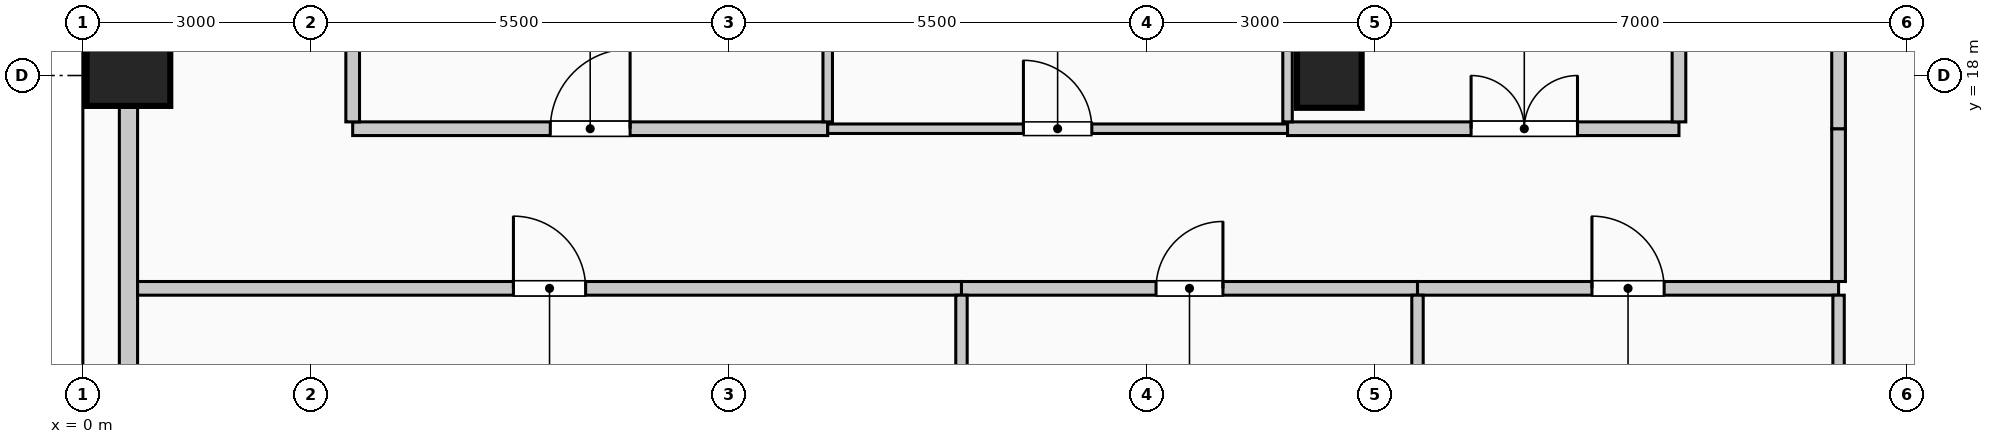
"""IFC4 building model, lengths in metres.
Left out: names, types, materials, properties, quantities, classifications, styles, units other than length and angle.
Written with IfcOpenShell. Run it as: python <this file> out.ifc"""

import sys

from ifc_helpers import new_model, si_unit, direction, frame, frame_2d, origin, origin_2d, place, context, subcontext, project, spatial, rectangle, circle, extrude, element, fill, save


model = new_model("IFC4")
c1 = context("Model", 3, precision=1e-05, world=origin(), true_north=direction((0.0, 1.0)))
c2 = subcontext(c1, "Body", "Model", "MODEL_VIEW")
j1 = project(units=[si_unit("LENGTHUNIT", "METRE"), si_unit("PLANEANGLEUNIT", "RADIAN")], contexts=[c1])
p1 = place(None, origin())
s1 = spatial("IfcSite", under=j1, at=p1, CompositionType="ELEMENT")
p2 = place(p1, origin())
s2 = spatial("IfcBuilding", under=s1, at=p2, CompositionType="ELEMENT")
p3 = place(p2, frame((0.0, 0.0, 170.6)))
s3 = spatial("IfcBuildingStorey", under=s2, at=p3, CompositionType="ELEMENT", Elevation=170.6)
p4 = place(p3, frame((0.6, 18.0, 0.0), z_axis=(0.0, 0.0, 1.0), x_axis=(0.0, 1.0, 0.0)))
e1 = element("IfcColumn", 1, at=p4, inside=s3, PredefinedType="COLUMN", context=c2, shape_type="SweptSolid", body=[
    extrude(rectangle(XDim=0.8, YDim=1.1, at=origin_2d()), origin(), (0.0, 0.0, 1.0), 4.0),
])
p5 = place(p3, frame((16.4, 18.0, 0.0), z_axis=(0.0, 0.0, 1.0), x_axis=(1.0, 0.0, 0.0)))
e2 = element("IfcColumn", 2, at=p5, inside=s3, PredefinedType="COLUMN", context=c2, shape_type="SweptSolid", body=[
    extrude(circle(Radius=0.425, at=origin_2d()), origin(), (0.0, 0.0, 1.0), 4.0),
])
p6 = place(p3, frame((0.6, 10.42, 0.0), z_axis=(0.0, 0.0, 1.0), x_axis=(0.0, 1.0, 0.0)))
e3 = element("IfcWall", 3, at=p6, inside=s3, PredefinedType="SOLIDWALL", context=c2, shape_type="SweptSolid", body=[
    extrude(rectangle(XDim=7.16, YDim=0.24, at=frame_2d((3.58, 0.0))), origin(), (0.0, 0.0, 1.0), 2.975),
])
p7 = place(p6, frame((1.387, 0.0, 0.42)))
e4 = element("IfcOpeningElement", 4, at=p7, cuts=e3, PredefinedType="OPENING", context=c2, shape_type="SweptSolid", body=[
    extrude(rectangle(XDim=1.5, YDim=2.2, at=frame_2d((0.75, 1.1))), frame((0.0, 0.13, 0.0), z_axis=(0.0, -1.0, 0.0), x_axis=(1.0, 0.0, 0.0)), (0.0, 0.0, 1.0), 0.26),
])
p8 = place(p3, frame((0.72, 15.2, 0.0), z_axis=(0.0, 0.0, 1.0), x_axis=(1.0, 0.0, 0.0)))
e5 = element("IfcWall", 5, at=p8, inside=s3, PredefinedType="PARTITIONING", context=c2, shape_type="SweptSolid", body=[
    extrude(rectangle(XDim=10.84, YDim=0.18, at=frame_2d((5.42, 0.0))), origin(), (0.0, 0.0, 1.0), 3.725),
])
p9 = place(p8, frame((4.945, 0.0, 0.0)))
e6 = element("IfcOpeningElement", 6, at=p9, cuts=e5, PredefinedType="OPENING", context=c2, shape_type="SweptSolid", body=[
    extrude(rectangle(XDim=0.95, YDim=2.15, at=frame_2d((0.475, 1.075))), frame((0.0, 0.1, 0.0), z_axis=(0.0, -1.0, 0.0), x_axis=(1.0, 0.0, 0.0)), (0.0, 0.0, 1.0), 0.2),
])
p10 = place(p3, frame((11.56, 15.2, 0.0), z_axis=(0.0, 0.0, 1.0), x_axis=(1.0, 0.0, 0.0)))
e7 = element("IfcWall", 7, at=p10, inside=s3, PredefinedType="PARTITIONING", context=c2, shape_type="SweptSolid", body=[
    extrude(rectangle(XDim=6.0, YDim=0.18, at=frame_2d((3.0, 0.0))), origin(), (0.0, 0.0, 1.0), 3.725),
])
p11 = place(p10, frame((2.56, 0.0, 0.0)))
e8 = element("IfcOpeningElement", 8, at=p11, cuts=e7, PredefinedType="OPENING", context=c2, shape_type="SweptSolid", body=[
    extrude(rectangle(XDim=0.88, YDim=2.1, at=frame_2d((0.44, 1.05))), frame((0.0, 0.1, 0.0), z_axis=(0.0, -1.0, 0.0), x_axis=(1.0, 0.0, 0.0)), (0.0, 0.0, 1.0), 0.2),
])
p12 = place(p3, frame((17.56, 15.2, 0.0), z_axis=(0.0, 0.0, 1.0), x_axis=(1.0, 0.0, 0.0)))
e9 = element("IfcWall", 9, at=p12, inside=s3, PredefinedType="PARTITIONING", context=c2, shape_type="SweptSolid", body=[
    extrude(rectangle(XDim=5.54, YDim=0.18, at=frame_2d((2.77, 0.0))), origin(), (0.0, 0.0, 1.0), 3.725),
])
p13 = place(p12, frame((2.295, 0.0, 0.0)))
e10 = element("IfcOpeningElement", 10, at=p13, cuts=e9, PredefinedType="OPENING", context=c2, shape_type="SweptSolid", body=[
    extrude(rectangle(XDim=0.95, YDim=2.15, at=frame_2d((0.475, 1.075))), frame((0.0, 0.1, 0.0), z_axis=(0.0, -1.0, 0.0), x_axis=(1.0, 0.0, 0.0)), (0.0, 0.0, 1.0), 0.2),
])
p14 = place(p3, frame((3.55, 17.3, 0.0), z_axis=(0.0, 0.0, 1.0), x_axis=(1.0, 0.0, 0.0)))
e11 = element("IfcWall", 11, at=p14, inside=s3, PredefinedType="PARTITIONING", context=c2, shape_type="SweptSolid", body=[
    extrude(rectangle(XDim=6.25, YDim=0.18, at=frame_2d((3.125, 0.0))), origin(), (0.0, 0.0, 1.0), 3.725),
])
p15 = place(p14, frame((2.6, 0.0, 0.0)))
e12 = element("IfcOpeningElement", 12, at=p15, cuts=e11, PredefinedType="OPENING", context=c2, shape_type="SweptSolid", body=[
    extrude(rectangle(XDim=1.05, YDim=2.15, at=frame_2d((0.525, 1.075))), frame((0.0, 0.1, 0.0), z_axis=(0.0, -1.0, 0.0), x_axis=(1.0, 0.0, 0.0)), (0.0, 0.0, 1.0), 0.2),
])
p16 = place(p3, frame((9.8, 17.3, 0.0), z_axis=(0.0, 0.0, 1.0), x_axis=(1.0, 0.0, 0.0)))
e13 = element("IfcWall", 13, at=p16, inside=s3, PredefinedType="PARTITIONING", context=c2, shape_type="SweptSolid", body=[
    extrude(rectangle(XDim=6.05, YDim=0.125, at=frame_2d((3.025, 0.0))), origin(), (0.0, 0.0, 1.0), 3.725),
])
p17 = place(p16, frame((2.575, 0.0, 0.0)))
e14 = element("IfcOpeningElement", 14, at=p17, cuts=e13, PredefinedType="OPENING", context=c2, shape_type="SweptSolid", body=[
    extrude(rectangle(XDim=0.9, YDim=2.1, at=frame_2d((0.45, 1.05))), frame((0.0, 0.073, 0.0), z_axis=(0.0, -1.0, 0.0), x_axis=(1.0, 0.0, 0.0)), (0.0, 0.0, 1.0), 0.145),
])
p18 = place(p3, frame((15.85, 17.3, 0.0), z_axis=(0.0, 0.0, 1.0), x_axis=(1.0, 0.0, 0.0)))
e15 = element("IfcWall", 15, at=p18, inside=s3, PredefinedType="PARTITIONING", context=c2, shape_type="SweptSolid", body=[
    extrude(rectangle(XDim=5.15, YDim=0.18, at=frame_2d((2.575, 0.0))), origin(), (0.0, 0.0, 1.0), 3.725),
])
p19 = place(p18, frame((2.415, 0.0, 0.0)))
e16 = element("IfcOpeningElement", 16, at=p19, cuts=e15, PredefinedType="OPENING", context=c2, shape_type="SweptSolid", body=[
    extrude(rectangle(XDim=1.4, YDim=2.2, at=frame_2d((0.7, 1.1))), frame((0.0, 0.1, 0.0), z_axis=(0.0, -1.0, 0.0), x_axis=(1.0, 0.0, 0.0)), (0.0, 0.0, 1.0), 0.2),
])
p20 = place(p3, frame((3.55, 17.39, 0.0), z_axis=(0.0, 0.0, 1.0), x_axis=(0.0, 1.0, 0.0)))
e17 = element("IfcWall", 17, at=p20, inside=s3, PredefinedType="PARTITIONING", context=c2, shape_type="SweptSolid", body=[
    extrude(rectangle(XDim=7.335, YDim=0.18, at=frame_2d((3.667, 0.0))), origin(), (0.0, 0.0, 1.0), 3.725),
])
p21 = place(p3, frame((9.8, 17.39, 0.0), z_axis=(0.0, 0.0, 1.0), x_axis=(0.0, 1.0, 0.0)))
e18 = element("IfcWall", 18, at=p21, inside=s3, PredefinedType="PARTITIONING", context=c2, shape_type="SweptSolid", body=[
    extrude(rectangle(XDim=7.335, YDim=0.125, at=frame_2d((3.667, 0.0))), origin(), (0.0, 0.0, 1.0), 3.725),
])
p22 = place(p3, frame((11.56, 0.72, 0.0), z_axis=(0.0, 0.0, 1.0), x_axis=(0.0, 1.0, 0.0)))
e19 = element("IfcWall", 19, at=p22, inside=s3, PredefinedType="PARTITIONING", context=c2, shape_type="SweptSolid", body=[
    extrude(rectangle(XDim=14.39, YDim=0.15, at=frame_2d((7.195, 0.0))), origin(), (0.0, 0.0, 1.0), 3.725),
])
p23 = place(p3, frame((15.85, 17.39, 0.0), z_axis=(0.0, 0.0, 1.0), x_axis=(0.0, 1.0, 0.0)))
e20 = element("IfcWall", 20, at=p23, inside=s3, PredefinedType="PARTITIONING", context=c2, shape_type="SweptSolid", body=[
    extrude(rectangle(XDim=7.335, YDim=0.125, at=frame_2d((3.667, 0.0))), origin(), (0.0, 0.0, 1.0), 3.725),
])
p24 = place(p3, frame((17.56, 0.72, 0.0), z_axis=(0.0, 0.0, 1.0), x_axis=(0.0, 1.0, 0.0)))
e21 = element("IfcWall", 21, at=p24, inside=s3, PredefinedType="PARTITIONING", context=c2, shape_type="SweptSolid", body=[
    extrude(rectangle(XDim=14.39, YDim=0.15, at=frame_2d((7.195, 0.0))), origin(), (0.0, 0.0, 1.0), 3.725),
])
p25 = place(p3, frame((21.0, 17.39, 0.0), z_axis=(0.0, 0.0, 1.0), x_axis=(0.0, 1.0, 0.0)))
e22 = element("IfcWall", 22, at=p25, inside=s3, PredefinedType="PARTITIONING", context=c2, shape_type="SweptSolid", body=[
    extrude(rectangle(XDim=7.335, YDim=0.18, at=frame_2d((3.667, 0.0))), origin(), (0.0, 0.0, 1.0), 3.725),
])
p26 = place(p3, frame((23.1, 0.72, 0.0), z_axis=(0.0, 0.0, 1.0), x_axis=(0.0, 1.0, 0.0)))
e23 = element("IfcWall", 23, at=p26, inside=s3, PredefinedType="PARTITIONING", context=c2, shape_type="SweptSolid", body=[
    extrude(rectangle(XDim=14.39, YDim=0.15, at=frame_2d((7.195, 0.0))), origin(), (0.0, 0.0, 1.0), 3.725),
])
p27 = place(p3, frame((23.1, 15.29, 0.0), z_axis=(0.0, 0.0, 1.0), x_axis=(0.0, 1.0, 0.0)))
e24 = element("IfcWall", 24, at=p27, inside=s3, PredefinedType="PARTITIONING", context=c2, shape_type="SweptSolid", body=[
    extrude(rectangle(XDim=2.01, YDim=0.18, at=frame_2d((1.005, 0.0))), origin(), (0.0, 0.0, 1.0), 3.725),
])
p28 = place(p3, frame((23.1, 17.3, 0.0), z_axis=(0.0, 0.0, 1.0), x_axis=(0.0, 1.0, 0.0)))
e25 = element("IfcWall", 25, at=p28, inside=s3, PredefinedType="PARTITIONING", context=c2, shape_type="SweptSolid", body=[
    extrude(rectangle(XDim=9.51, YDim=0.18, at=frame_2d((4.755, 0.0))), origin(), (0.0, 0.0, 1.0), 3.725),
])
p29 = place(p9, origin())
e26 = element("IfcDoor", 26, at=p29, inside=s3, OperationType="SINGLE_SWING_LEFT", PredefinedType="DOOR", context=c2, shape_type="SweptSolid", body=[
    extrude(rectangle(XDim=0.95, YDim=2.15, at=frame_2d((0.475, 1.075))), frame((0.0, 0.025, 0.0), z_axis=(0.0, -1.0, 0.0), x_axis=(1.0, 0.0, 0.0)), (0.0, 0.0, 1.0), 0.05),
])
fill(e6, e26)
p30 = place(p11, origin())
e27 = element("IfcDoor", 27, at=p30, inside=s3, OperationType="SINGLE_SWING_RIGHT", PredefinedType="DOOR", context=c2, shape_type="SweptSolid", body=[
    extrude(rectangle(XDim=0.88, YDim=2.1, at=frame_2d((0.44, 1.05))), frame((0.0, 0.025, 0.0), z_axis=(0.0, -1.0, 0.0), x_axis=(1.0, 0.0, 0.0)), (0.0, 0.0, 1.0), 0.05),
])
fill(e8, e27)
p31 = place(p13, origin())
e28 = element("IfcDoor", 28, at=p31, inside=s3, OperationType="SINGLE_SWING_LEFT", PredefinedType="DOOR", context=c2, shape_type="SweptSolid", body=[
    extrude(rectangle(XDim=0.95, YDim=2.15, at=frame_2d((0.475, 1.075))), frame((0.0, 0.025, 0.0), z_axis=(0.0, -1.0, 0.0), x_axis=(1.0, 0.0, 0.0)), (0.0, 0.0, 1.0), 0.05),
])
fill(e10, e28)
p32 = place(p15, origin())
e29 = element("IfcDoor", 29, at=p32, inside=s3, OperationType="SINGLE_SWING_RIGHT", PredefinedType="DOOR", context=c2, shape_type="SweptSolid", body=[
    extrude(rectangle(XDim=1.05, YDim=2.15, at=frame_2d((0.525, 1.075))), frame((0.0, 0.025, 0.0), z_axis=(0.0, -1.0, 0.0), x_axis=(1.0, 0.0, 0.0)), (0.0, 0.0, 1.0), 0.05),
])
fill(e12, e29)
p33 = place(p17, origin())
e30 = element("IfcDoor", 30, at=p33, inside=s3, OperationType="SINGLE_SWING_LEFT", PredefinedType="DOOR", context=c2, shape_type="SweptSolid", body=[
    extrude(rectangle(XDim=0.9, YDim=2.1, at=frame_2d((0.45, 1.05))), frame((0.0, 0.025, 0.0), z_axis=(0.0, -1.0, 0.0), x_axis=(1.0, 0.0, 0.0)), (0.0, 0.0, 1.0), 0.05),
])
fill(e14, e30)
p34 = place(p19, origin())
e31 = element("IfcDoor", 31, at=p34, inside=s3, OperationType="DOUBLE_DOOR_SINGLE_SWING", PredefinedType="DOOR", context=c2, shape_type="SweptSolid", body=[
    extrude(rectangle(XDim=1.4, YDim=2.2, at=frame_2d((0.7, 1.1))), frame((0.0, 0.025, 0.0), z_axis=(0.0, -1.0, 0.0), x_axis=(1.0, 0.0, 0.0)), (0.0, 0.0, 1.0), 0.05),
])
fill(e16, e31)
save(model, sys.argv[1])
